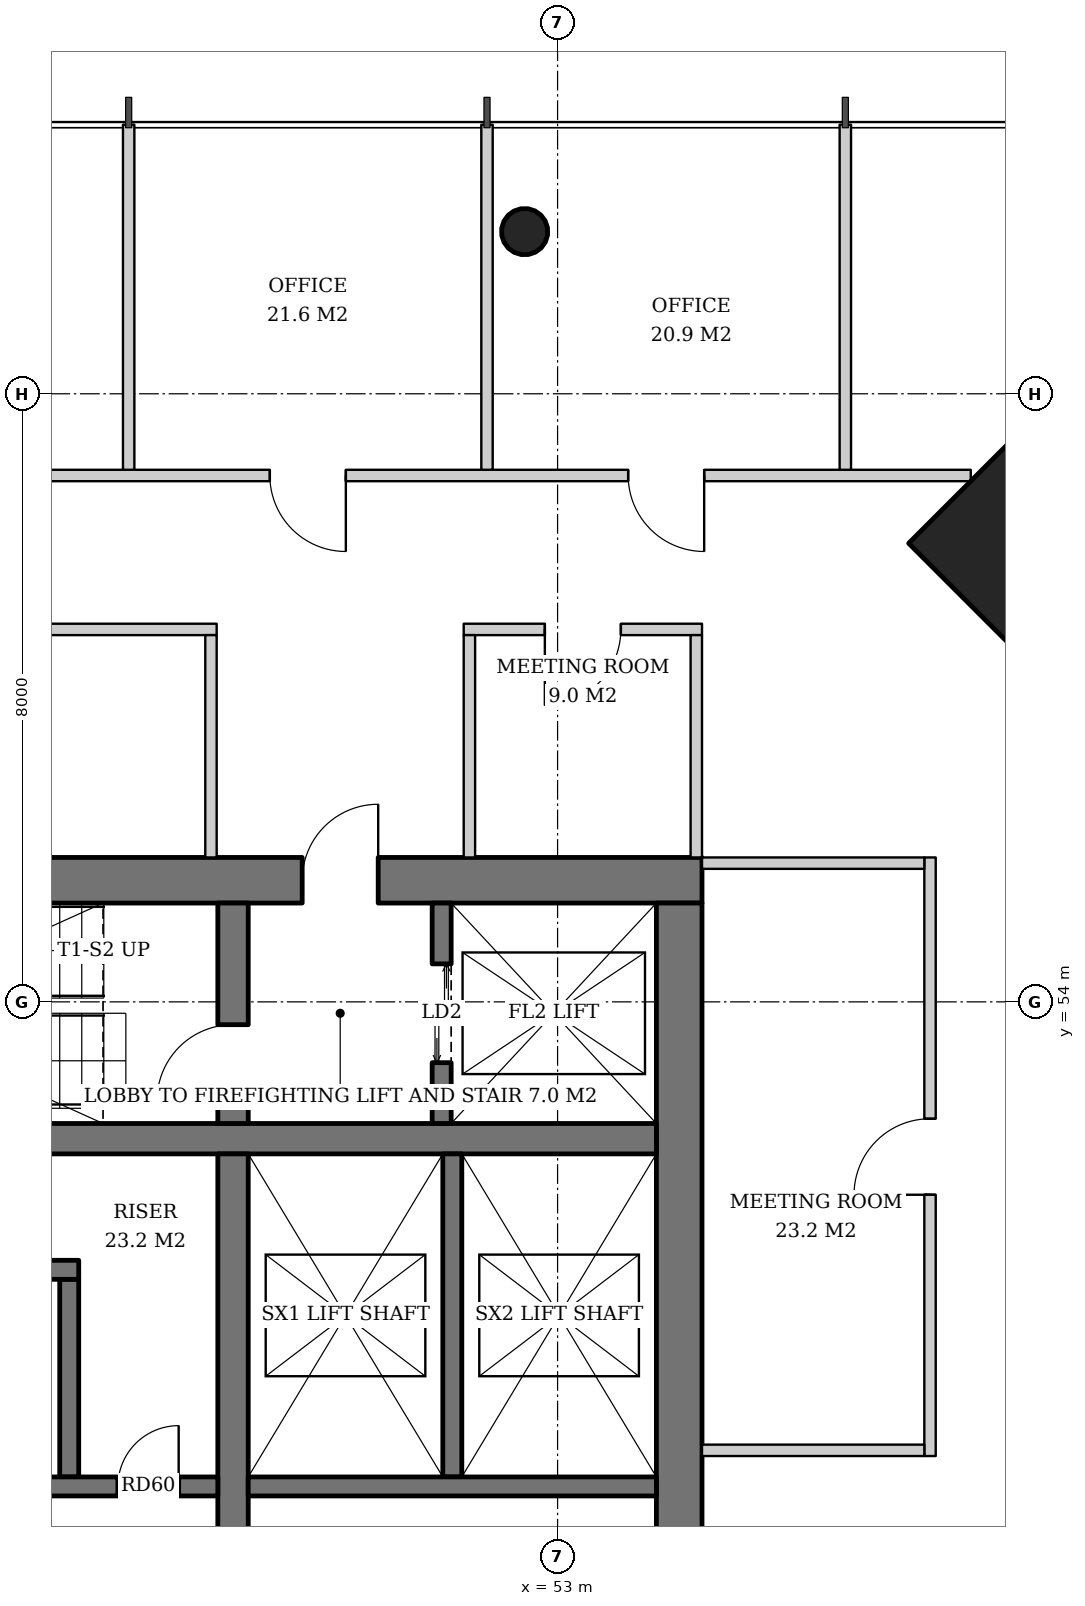
"""IFC4 building model, lengths in metres.
Left out: names, types, materials, properties, quantities, classifications, styles, units other than length and angle.
Written with IfcOpenShell. Run it as: python <this file> out.ifc"""

import sys

from ifc_helpers import new_model, si_unit, direction, frame, frame_2d, origin, origin_2d, place, context, subcontext, project, spatial, rectangle, hollow_circle, extrude, element, fill, save


model = new_model("IFC4")
c1 = context("Model", 3, precision=1e-05, world=origin(), true_north=direction((0.0, 1.0)))
c2 = subcontext(c1, "Body", "Model", "MODEL_VIEW")
j1 = project(units=[si_unit("LENGTHUNIT", "METRE"), si_unit("PLANEANGLEUNIT", "RADIAN")], contexts=[c1])
p1 = place(None, origin())
s1 = spatial("IfcSite", under=j1, at=p1, CompositionType="ELEMENT")
p2 = place(p1, origin())
s2 = spatial("IfcBuilding", under=s1, at=p2, CompositionType="ELEMENT")
p3 = place(p2, frame((0.0, 0.0, 203.4)))
s3 = spatial("IfcBuildingStorey", under=s2, at=p3, CompositionType="ELEMENT", Elevation=203.4)
p4 = place(p3, frame((59.072, 60.072, 0.0), z_axis=(-0.031962158256, -0.031962158256, 0.998977898093), x_axis=(0.707106781187, -0.707106781187, 0.0)))
e1 = element("IfcColumn", 1, at=p4, inside=s3, PredefinedType="COLUMN", context=c2, shape_type="SweptSolid", body=[
    extrude(rectangle(XDim=2.0, YDim=2.0, at=origin_2d()), origin(), (0.0, 0.0, 1.0), 3.804),
])
p5 = place(p3, frame((52.586, 64.171, 0.0), z_axis=(-0.015987237665, -0.031910269556, 0.999362868496), x_axis=(0.894067115991, -0.447933021895, 0.0)))
e2 = element("IfcColumn", 2, at=p5, inside=s3, PredefinedType="COLUMN", context=c2, shape_type="SweptSolid", body=[
    extrude(hollow_circle(Radius=0.305, WallThickness=0.025, at=origin_2d()), origin(), (0.0, 0.0, 1.0), 3.802),
])
p6 = place(p3, frame((35.1, 55.6, 0.0), z_axis=(0.0, 0.0, 1.0), x_axis=(1.0, 0.0, 0.0)))
e3 = element("IfcWall", 3, at=p6, inside=s3, PredefinedType="SHEAR", context=c2, shape_type="SweptSolid", body=[
    extrude(rectangle(XDim=19.8, YDim=0.6, at=frame_2d((9.9, 0.0))), origin(), (0.0, 0.0, 1.0), 3.8),
])
p7 = place(p6, frame((14.54, 0.0, 0.0)))
e4 = element("IfcOpeningElement", 4, at=p7, cuts=e3, PredefinedType="OPENING", context=c2, shape_type="SweptSolid", body=[
    extrude(rectangle(XDim=1.0, YDim=2.1, at=frame_2d((0.5, 1.05))), frame((0.0, 0.31, 0.0), z_axis=(0.0, -1.0, 0.0), x_axis=(1.0, 0.0, 0.0)), (0.0, 0.0, 1.0), 0.62),
])
p8 = place(p6, frame((2.425, 0.0, 0.0)))
e5 = element("IfcOpeningElement", 5, at=p8, cuts=e3, PredefinedType="OPENING", context=c2, shape_type="SweptSolid", body=[
    extrude(rectangle(XDim=1.0, YDim=2.1, at=frame_2d((0.5, 1.05))), frame((0.0, 0.31, 0.0), z_axis=(0.0, -1.0, 0.0), x_axis=(1.0, 0.0, 0.0)), (0.0, 0.0, 1.0), 0.62),
])
p9 = place(p3, frame((54.6, 36.7, 0.0), z_axis=(0.0, 0.0, 1.0), x_axis=(0.0, 1.0, 0.0)))
e6 = element("IfcWall", 6, at=p9, inside=s3, PredefinedType="SHEAR", context=c2, shape_type="SweptSolid", body=[
    extrude(rectangle(XDim=18.6, YDim=0.6, at=frame_2d((9.3, 0.0))), origin(), (0.0, 0.0, 1.0), 3.8),
])
p10 = place(p9, frame((8.4, 0.0, 0.0)))
e7 = element("IfcOpeningElement", 7, at=p10, cuts=e6, PredefinedType="OPENING", context=c2, shape_type="SweptSolid", body=[
    extrude(rectangle(XDim=1.8, YDim=2.4, at=frame_2d((0.9, 1.2))), frame((0.0, 0.31, 0.0), z_axis=(0.0, -1.0, 0.0), x_axis=(1.0, 0.0, 0.0)), (0.0, 0.0, 1.0), 0.62),
])
p11 = place(p3, frame((35.7, 52.2, 0.0), z_axis=(0.0, 0.0, 1.0), x_axis=(1.0, 0.0, 0.0)))
e8 = element("IfcWall", 8, at=p11, inside=s3, PredefinedType="SHEAR", context=c2, shape_type="SweptSolid", body=[
    extrude(rectangle(XDim=18.6, YDim=0.4, at=frame_2d((9.3, 0.0))), origin(), (0.0, 0.0, 1.0), 3.8),
])
p12 = place(p3, frame((48.73, 40.0, 0.0), z_axis=(0.0, 0.0, 1.0), x_axis=(0.0, 1.0, 0.0)))
e9 = element("IfcWall", 9, at=p12, inside=s3, PredefinedType="SHEAR", context=c2, shape_type="SweptSolid", body=[
    extrude(rectangle(XDim=12.0, YDim=0.4, at=frame_2d((6.0, 0.0))), origin(), (0.0, 0.0, 1.0), 3.8),
])
p13 = place(p3, frame((48.73, 52.4, 0.0), z_axis=(0.0, 0.0, 1.0), x_axis=(0.0, 1.0, 0.0)))
e10 = element("IfcWall", 10, at=p13, inside=s3, PredefinedType="SHEAR", context=c2, shape_type="SweptSolid", body=[
    extrude(rectangle(XDim=2.9, YDim=0.4, at=frame_2d((1.45, 0.0))), origin(), (0.0, 0.0, 1.0), 3.8),
])
p14 = place(p13, frame((0.3, 0.0, 0.0)))
e11 = element("IfcOpeningElement", 11, at=p14, cuts=e10, PredefinedType="OPENING", context=c2, shape_type="SweptSolid", body=[
    extrude(rectangle(XDim=1.0, YDim=2.1, at=frame_2d((0.5, 1.05))), frame((0.0, 0.21, 0.0), z_axis=(0.0, -1.0, 0.0), x_axis=(1.0, 0.0, 0.0)), (0.0, 0.0, 1.0), 0.42),
])
p15 = place(p3, frame((51.475, 52.4, 0.0), z_axis=(0.0, 0.0, 1.0), x_axis=(0.0, 1.0, 0.0)))
e12 = element("IfcWall", 12, at=p15, inside=s3, PredefinedType="SHEAR", context=c2, shape_type="SweptSolid", body=[
    extrude(rectangle(XDim=2.9, YDim=0.25, at=frame_2d((1.45, 0.0))), origin(), (0.0, 0.0, 1.0), 3.8),
])
p16 = place(p15, frame((0.8, 0.0, 0.0)))
e13 = element("IfcOpeningElement", 13, at=p16, cuts=e12, PredefinedType="OPENING", context=c2, shape_type="SweptSolid", body=[
    extrude(rectangle(XDim=1.3, YDim=2.2, at=frame_2d((0.65, 1.1))), frame((0.0, 0.135, 0.0), z_axis=(0.0, -1.0, 0.0), x_axis=(1.0, 0.0, 0.0)), (0.0, 0.0, 1.0), 0.27),
])
p17 = place(p3, frame((46.575, 47.75, 0.0), z_axis=(0.0, 0.0, 1.0), x_axis=(0.0, 1.0, 0.0)))
e14 = element("IfcWall", 14, at=p17, inside=s3, PredefinedType="SHEAR", context=c2, shape_type="SweptSolid", body=[
    extrude(rectangle(XDim=2.6, YDim=0.25, at=frame_2d((1.3, 0.0))), origin(), (0.0, 0.0, 1.0), 3.8),
])
p18 = place(p3, frame((35.7, 50.475, 0.0), z_axis=(0.0, 0.0, 1.0), x_axis=(1.0, 0.0, 0.0)))
e15 = element("IfcWall", 15, at=p18, inside=s3, PredefinedType="SHEAR", context=c2, shape_type="SweptSolid", body=[
    extrude(rectangle(XDim=11.0, YDim=0.25, at=frame_2d((5.5, 0.0))), origin(), (0.0, 0.0, 1.0), 3.8),
])
p19 = place(p3, frame((35.7, 47.625, 0.0), z_axis=(0.0, 0.0, 1.0), x_axis=(1.0, 0.0, 0.0)))
e16 = element("IfcWall", 16, at=p19, inside=s3, PredefinedType="SHEAR", context=c2, shape_type="SweptSolid", body=[
    extrude(rectangle(XDim=12.83, YDim=0.25, at=frame_2d((6.415, 0.0))), origin(), (0.0, 0.0, 1.0), 3.8),
])
p20 = place(p19, frame((0.7, 0.0, 0.0)))
e17 = element("IfcOpeningElement", 17, at=p20, cuts=e16, PredefinedType="OPENING", context=c2, shape_type="SweptSolid", body=[
    extrude(rectangle(XDim=1.1, YDim=2.2, at=frame_2d((0.55, 1.1))), frame((0.0, 0.135, 0.0), z_axis=(0.0, -1.0, 0.0), x_axis=(1.0, 0.0, 0.0)), (0.0, 0.0, 1.0), 0.27),
])
p21 = place(p19, frame((3.45, 0.0, 0.0)))
e18 = element("IfcOpeningElement", 18, at=p21, cuts=e16, PredefinedType="OPENING", context=c2, shape_type="SweptSolid", body=[
    extrude(rectangle(XDim=1.1, YDim=2.2, at=frame_2d((0.55, 1.1))), frame((0.0, 0.135, 0.0), z_axis=(0.0, -1.0, 0.0), x_axis=(1.0, 0.0, 0.0)), (0.0, 0.0, 1.0), 0.27),
])
p22 = place(p19, frame((6.2, 0.0, 0.0)))
e19 = element("IfcOpeningElement", 19, at=p22, cuts=e16, PredefinedType="OPENING", context=c2, shape_type="SweptSolid", body=[
    extrude(rectangle(XDim=1.1, YDim=2.2, at=frame_2d((0.55, 1.1))), frame((0.0, 0.135, 0.0), z_axis=(0.0, -1.0, 0.0), x_axis=(1.0, 0.0, 0.0)), (0.0, 0.0, 1.0), 0.27),
])
p23 = place(p19, frame((9.0, 0.0, 0.0)))
e20 = element("IfcOpeningElement", 20, at=p23, cuts=e16, PredefinedType="OPENING", context=c2, shape_type="SweptSolid", body=[
    extrude(rectangle(XDim=1.0, YDim=2.1, at=frame_2d((0.5, 1.05))), frame((0.0, 0.135, 0.0), z_axis=(0.0, -1.0, 0.0), x_axis=(1.0, 0.0, 0.0)), (0.0, 0.0, 1.0), 0.27),
])
p24 = place(p19, frame((11.515, 0.0, 0.0)))
e21 = element("IfcOpeningElement", 21, at=p24, cuts=e16, PredefinedType="OPENING", context=c2, shape_type="SweptSolid", body=[
    extrude(rectangle(XDim=0.8, YDim=2.0, at=frame_2d((0.4, 1.0))), frame((0.0, 0.135, 0.0), z_axis=(0.0, -1.0, 0.0), x_axis=(1.0, 0.0, 0.0)), (0.0, 0.0, 1.0), 0.27),
])
p25 = place(p3, frame((51.615, 47.75, 0.0), z_axis=(0.0, 0.0, 1.0), x_axis=(0.0, 1.0, 0.0)))
e22 = element("IfcWall", 22, at=p25, inside=s3, PredefinedType="SHEAR", context=c2, shape_type="SweptSolid", body=[
    extrude(rectangle(XDim=4.25, YDim=0.25, at=frame_2d((2.125, 0.0))), origin(), (0.0, 0.0, 1.0), 3.8),
])
p26 = place(p3, frame((48.93, 47.625, 0.0), z_axis=(0.0, 0.0, 1.0), x_axis=(1.0, 0.0, 0.0)))
e23 = element("IfcWall", 23, at=p26, inside=s3, PredefinedType="SHEAR", context=c2, shape_type="SweptSolid", body=[
    extrude(rectangle(XDim=5.37, YDim=0.25, at=frame_2d((2.685, 0.0))), origin(), (0.0, 0.0, 1.0), 3.8),
])
p27 = place(p3, frame((57.9, 48.025, 0.0), z_axis=(0.0, 0.0, 1.0), x_axis=(0.0, 1.0, 0.0)))
e24 = element("IfcWall", 24, at=p27, inside=s3, PredefinedType="PARTITIONING", context=c2, shape_type="SweptSolid", body=[
    extrude(rectangle(XDim=7.875, YDim=0.15, at=frame_2d((3.938, 0.0))), origin(), (0.0, 0.0, 1.0), 2.867),
])
p28 = place(p27, frame((3.438, 0.0, 0.0)))
e25 = element("IfcOpeningElement", 25, at=p28, cuts=e24, PredefinedType="OPENING", context=c2, shape_type="SweptSolid", body=[
    extrude(rectangle(XDim=1.0, YDim=2.1, at=frame_2d((0.5, 1.05))), frame((0.0, 0.085, 0.0), z_axis=(0.0, -1.0, 0.0), x_axis=(1.0, 0.0, 0.0)), (0.0, 0.0, 1.0), 0.17),
])
p29 = place(p3, frame((54.9, 48.1, 0.0), z_axis=(0.0, 0.0, 1.0), x_axis=(1.0, 0.0, 0.0)))
e26 = element("IfcWall", 26, at=p29, inside=s3, PredefinedType="PARTITIONING", context=c2, shape_type="SweptSolid", body=[
    extrude(rectangle(XDim=2.925, YDim=0.15, at=frame_2d((1.462, 0.0))), origin(), (0.0, 0.0, 1.0), 2.867),
])
p30 = place(p3, frame((54.9, 55.825, 0.0), z_axis=(0.0, 0.0, 1.0), x_axis=(1.0, 0.0, 0.0)))
e27 = element("IfcWall", 27, at=p30, inside=s3, PredefinedType="PARTITIONING", context=c2, shape_type="SweptSolid", body=[
    extrude(rectangle(XDim=2.925, YDim=0.15, at=frame_2d((1.462, 0.0))), origin(), (0.0, 0.0, 1.0), 3.62),
])
p31 = place(p3, frame((54.9, 58.9, 0.0), z_axis=(0.0, 0.0, 1.0), x_axis=(-1.0, 0.0, 0.0)))
e28 = element("IfcWall", 28, at=p31, inside=s3, PredefinedType="PARTITIONING", context=c2, shape_type="SweptSolid", body=[
    extrude(rectangle(XDim=3.135, YDim=0.15, at=frame_2d((1.567, 0.0))), origin(), (0.0, 0.0, 1.0), 2.92),
])
p32 = place(p31, frame((1.067, 0.0, 0.0)))
e29 = element("IfcOpeningElement", 29, at=p32, cuts=e28, PredefinedType="OPENING", context=c2, shape_type="SweptSolid", body=[
    extrude(rectangle(XDim=1.0, YDim=2.1, at=frame_2d((0.5, 1.05))), frame((0.0, 0.085, 0.0), z_axis=(0.0, -1.0, 0.0), x_axis=(1.0, 0.0, 0.0)), (0.0, 0.0, 1.0), 0.17),
])
p33 = place(p3, frame((54.825, 55.9, 0.0), z_axis=(0.0, 0.0, 1.0), x_axis=(0.0, 1.0, 0.0)))
e30 = element("IfcWall", 30, at=p33, inside=s3, PredefinedType="PARTITIONING", context=c2, shape_type="SweptSolid", body=[
    extrude(rectangle(XDim=2.925, YDim=0.15, at=frame_2d((1.462, 0.0))), origin(), (0.0, 0.0, 1.0), 2.867),
])
p34 = place(p3, frame((51.84, 55.9, 0.0), z_axis=(0.0, 0.0, 1.0), x_axis=(0.0, 1.0, 0.0)))
e31 = element("IfcWall", 31, at=p34, inside=s3, PredefinedType="PARTITIONING", context=c2, shape_type="SweptSolid", body=[
    extrude(rectangle(XDim=2.925, YDim=0.15, at=frame_2d((1.462, 0.0))), origin(), (0.0, 0.0, 1.0), 3.62),
])
p35 = place(p3, frame((48.515, 58.9, 0.0), z_axis=(0.0, 0.0, 1.0), x_axis=(-1.0, 0.0, 0.0)))
e32 = element("IfcWall", 32, at=p35, inside=s3, PredefinedType="PARTITIONING", context=c2, shape_type="SweptSolid", body=[
    extrude(rectangle(XDim=8.865, YDim=0.15, at=frame_2d((4.433, 0.0))), origin(), (0.0, 0.0, 1.0), 2.867),
])
p36 = place(p35, frame((3.933, 0.0, 0.0)))
e33 = element("IfcOpeningElement", 33, at=p36, cuts=e32, PredefinedType="OPENING", context=c2, shape_type="SweptSolid", body=[
    extrude(rectangle(XDim=1.0, YDim=2.1, at=frame_2d((0.5, 1.05))), frame((0.0, 0.085, 0.0), z_axis=(0.0, -1.0, 0.0), x_axis=(1.0, 0.0, 0.0)), (0.0, 0.0, 1.0), 0.17),
])
p37 = place(p3, frame((48.44, 55.9, 0.0), z_axis=(0.0, 0.0, 1.0), x_axis=(0.0, 1.0, 0.0)))
e34 = element("IfcWall", 34, at=p37, inside=s3, PredefinedType="PARTITIONING", context=c2, shape_type="SweptSolid", body=[
    extrude(rectangle(XDim=2.925, YDim=0.15, at=frame_2d((1.462, 0.0))), origin(), (0.0, 0.0, 1.0), 3.62),
])
p38 = place(p3, frame((58.436, 60.925, 0.0), z_axis=(0.0, 0.0, 1.0), x_axis=(-1.0, 0.0, 0.0)))
e35 = element("IfcWall", 35, at=p38, inside=s3, PredefinedType="PARTITIONING", context=c2, shape_type="SweptSolid", body=[
    extrude(rectangle(XDim=26.872, YDim=0.15, at=frame_2d((13.436, 0.0))), origin(), (0.0, 0.0, 1.0), 2.867),
])
p39 = place(p38, frame((3.507, 0.0, 0.0)))
e36 = element("IfcOpeningElement", 36, at=p39, cuts=e35, PredefinedType="OPENING", context=c2, shape_type="SweptSolid", body=[
    extrude(rectangle(XDim=1.0, YDim=2.1, at=frame_2d((0.5, 1.05))), frame((0.0, 0.085, 0.0), z_axis=(0.0, -1.0, 0.0), x_axis=(1.0, 0.0, 0.0)), (0.0, 0.0, 1.0), 0.17),
])
p40 = place(p38, frame((8.221, 0.0, 0.0)))
e37 = element("IfcOpeningElement", 37, at=p40, cuts=e35, PredefinedType="OPENING", context=c2, shape_type="SweptSolid", body=[
    extrude(rectangle(XDim=1.0, YDim=2.1, at=frame_2d((0.5, 1.05))), frame((0.0, 0.085, 0.0), z_axis=(0.0, -1.0, 0.0), x_axis=(1.0, 0.0, 0.0)), (0.0, 0.0, 1.0), 0.17),
])
p41 = place(p38, frame((12.536, 0.0, 0.0)))
e38 = element("IfcOpeningElement", 38, at=p41, cuts=e35, PredefinedType="OPENING", context=c2, shape_type="SweptSolid", body=[
    extrude(rectangle(XDim=1.8, YDim=2.4, at=frame_2d((0.9, 1.2))), frame((0.0, 0.085, 0.0), z_axis=(0.0, -1.0, 0.0), x_axis=(1.0, 0.0, 0.0)), (0.0, 0.0, 1.0), 0.17),
])
p42 = place(p38, frame((22.364, 0.0, 0.0)))
e39 = element("IfcOpeningElement", 39, at=p42, cuts=e35, PredefinedType="OPENING", context=c2, shape_type="SweptSolid", body=[
    extrude(rectangle(XDim=1.0, YDim=2.1, at=frame_2d((0.5, 1.05))), frame((0.0, 0.085, 0.0), z_axis=(0.0, -1.0, 0.0), x_axis=(1.0, 0.0, 0.0)), (0.0, 0.0, 1.0), 0.17),
])
for number, where, z_axis, x_axis in (
    (40, (56.786, 61.0, 0.0), (0.0, 0.0, 1.0), (0.0, 1.0, 0.0)),
    (41, (52.072, 61.0, 0.0), (0.0, 0.0, 1.0), (0.0, 1.0, 0.0)),
    (42, (47.357, 61.0, 0.0), (0.0, 0.0, 1.0), (0.0, 1.0, 0.0)),
):
    element("IfcWall", number, at=place(p3, frame(where, z_axis=z_axis, x_axis=x_axis)), inside=s3, PredefinedType="PARTITIONING", context=c2, shape_type="SweptSolid", body=[
        extrude(rectangle(XDim=4.54, YDim=0.15, at=frame_2d((2.27, 0.0))), origin(), (0.0, 0.0, 1.0), 3.12),
    ])
p43 = place(p16, origin())
e43 = element("IfcDoor", 43, at=p43, inside=s3, OperationType="DOUBLE_DOOR_SLIDING", PredefinedType="DOOR", context=c2, shape_type="SweptSolid", body=[
    extrude(rectangle(XDim=1.3, YDim=2.2, at=frame_2d((0.65, 1.1))), frame((0.0, 0.025, 0.0), z_axis=(0.0, -1.0, 0.0), x_axis=(1.0, 0.0, 0.0)), (0.0, 0.0, 1.0), 0.05),
])
fill(e13, e43)
p44 = place(p24, origin())
e44 = element("IfcDoor", 44, at=p44, inside=s3, OperationType="SINGLE_SWING_RIGHT", PredefinedType="DOOR", context=c2, shape_type="SweptSolid", body=[
    extrude(rectangle(XDim=0.8, YDim=2.0, at=frame_2d((0.4, 1.0))), frame((0.0, 0.025, 0.0), z_axis=(0.0, -1.0, 0.0), x_axis=(1.0, 0.0, 0.0)), (0.0, 0.0, 1.0), 0.05),
])
fill(e21, e44)
p45 = place(p14, origin())
e45 = element("IfcDoor", 45, at=p45, inside=s3, OperationType="SINGLE_SWING_LEFT", PredefinedType="DOOR", context=c2, shape_type="SweptSolid", body=[
    extrude(rectangle(XDim=1.0, YDim=2.1, at=frame_2d((0.5, 1.05))), frame((0.0, 0.025, 0.0), z_axis=(0.0, -1.0, 0.0), x_axis=(1.0, 0.0, 0.0)), (0.0, 0.0, 1.0), 0.05),
])
fill(e11, e45)
p46 = place(p7, origin())
e46 = element("IfcDoor", 46, at=p46, inside=s3, OperationType="SINGLE_SWING_RIGHT", PredefinedType="DOOR", context=c2, shape_type="SweptSolid", body=[
    extrude(rectangle(XDim=1.0, YDim=2.1, at=frame_2d((0.5, 1.05))), frame((0.0, 0.025, 0.0), z_axis=(0.0, -1.0, 0.0), x_axis=(1.0, 0.0, 0.0)), (0.0, 0.0, 1.0), 0.05),
])
fill(e4, e46)
p47 = place(p28, origin())
e47 = element("IfcDoor", 47, at=p47, inside=s3, OperationType="SINGLE_SWING_LEFT", PredefinedType="DOOR", context=c2, shape_type="SweptSolid", body=[
    extrude(rectangle(XDim=1.0, YDim=2.1, at=frame_2d((0.5, 1.05))), frame((0.0, 0.025, 0.0), z_axis=(0.0, -1.0, 0.0), x_axis=(1.0, 0.0, 0.0)), (0.0, 0.0, 1.0), 0.05),
])
fill(e25, e47)
p48 = place(p32, origin())
e48 = element("IfcDoor", 48, at=p48, inside=s3, OperationType="SINGLE_SWING_RIGHT", PredefinedType="DOOR", context=c2, shape_type="SweptSolid", body=[
    extrude(rectangle(XDim=1.0, YDim=2.1, at=frame_2d((0.5, 1.05))), frame((0.0, 0.025, 0.0), z_axis=(0.0, -1.0, 0.0), x_axis=(1.0, 0.0, 0.0)), (0.0, 0.0, 1.0), 0.05),
])
fill(e29, e48)
p49 = place(p39, origin())
e49 = element("IfcDoor", 49, at=p49, inside=s3, OperationType="SINGLE_SWING_LEFT", PredefinedType="DOOR", context=c2, shape_type="SweptSolid", body=[
    extrude(rectangle(XDim=1.0, YDim=2.1, at=frame_2d((0.5, 1.05))), frame((0.0, 0.025, 0.0), z_axis=(0.0, -1.0, 0.0), x_axis=(1.0, 0.0, 0.0)), (0.0, 0.0, 1.0), 0.05),
])
fill(e36, e49)
p50 = place(p40, origin())
e50 = element("IfcDoor", 50, at=p50, inside=s3, OperationType="SINGLE_SWING_LEFT", PredefinedType="DOOR", context=c2, shape_type="SweptSolid", body=[
    extrude(rectangle(XDim=1.0, YDim=2.1, at=frame_2d((0.5, 1.05))), frame((0.0, 0.025, 0.0), z_axis=(0.0, -1.0, 0.0), x_axis=(1.0, 0.0, 0.0)), (0.0, 0.0, 1.0), 0.05),
])
fill(e37, e50)
save(model, sys.argv[1])
